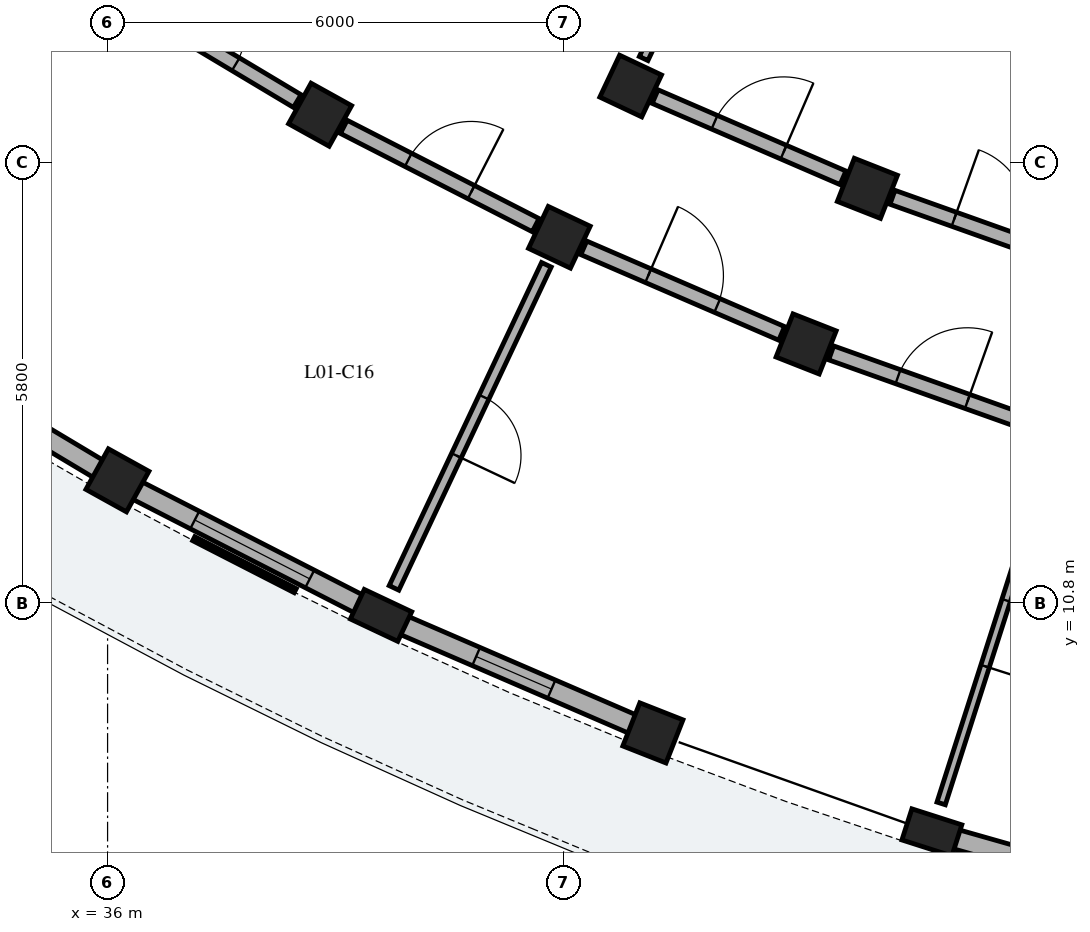
"""IFC4 building model, lengths in metres.
Left out: names, types, materials, properties, quantities, classifications, styles, units other than length and angle.
Written with IfcOpenShell. Run it as: python <this file> out.ifc"""

import sys

from ifc_helpers import new_model, si_unit, direction, frame, frame_2d, origin, origin_2d, place, context, subcontext, project, spatial, rectangle, extrude, element, fill, save


model = new_model("IFC4")
c1 = context("Model", 3, precision=1e-05, world=origin(), true_north=direction((0.0, 1.0)))
c2 = subcontext(c1, "Body", "Model", "MODEL_VIEW")
j1 = project(units=[si_unit("LENGTHUNIT", "METRE"), si_unit("PLANEANGLEUNIT", "RADIAN")], contexts=[c1])
p1 = place(None, origin())
s1 = spatial("IfcSite", under=j1, at=p1, CompositionType="ELEMENT")
p2 = place(p1, origin())
s2 = spatial("IfcBuilding", under=s1, at=p2, CompositionType="ELEMENT")
p3 = place(p2, frame((0.0, 0.0, 4.76)))
s3 = spatial("IfcBuildingStorey", under=s2, at=p3, CompositionType="ELEMENT", Elevation=4.76)
for number, where, z_axis, x_axis in (
    (1, (38.796, 17.227, 0.0), (0.0, 0.0, 1.0), (-0.485, -0.875, 0.0)),
    (2, (36.13, 12.417, 0.0), (0.0, 0.0, 1.0), (-0.485, -0.875, 0.0)),
    (3, (42.882, 17.604, 0.0), (0.0, 0.0, 1.0), (-0.427, -0.904, 0.0)),
    (4, (41.944, 15.614, 0.0), (0.0, 0.0, 1.0), (-0.427, -0.904, 0.0)),
):
    element("IfcColumn", number, at=place(p3, frame(where, z_axis=z_axis, x_axis=x_axis)), inside=s3, PredefinedType="COLUMN", context=c2, shape_type="SweptSolid", body=[
        extrude(rectangle(XDim=0.61, YDim=0.61, at=origin_2d()), origin(), (0.0, 0.0, 1.0), 3.825),
    ])
p4 = place(p3, frame((39.598, 10.64, 0.0), z_axis=(0.0, 0.0, 1.0), x_axis=(-0.426568739901, -0.904455145454, 0.0)))
e5 = element("IfcColumn", 5, at=p4, inside=s3, PredefinedType="PILASTER", context=c2, shape_type="SweptSolid", body=[
    extrude(rectangle(XDim=0.43, YDim=0.69, at=origin_2d()), origin(), (0.0, 0.0, 1.0), 3.825),
])
for number, where, z_axis, x_axis in (
    (6, (45.997, 16.258, 0.0), (0.0, 0.0, 1.0), (-0.367, -0.93, 0.0)),
    (7, (45.191, 14.211, 0.0), (0.0, 0.0, 1.0), (-0.367, -0.93, 0.0)),
    (8, (43.175, 9.094, 0.0), (0.0, 0.0, 1.0), (-0.367, -0.93, 0.0)),
):
    element("IfcColumn", number, at=place(p3, frame(where, z_axis=z_axis, x_axis=x_axis)), inside=s3, PredefinedType="COLUMN", context=c2, shape_type="SweptSolid", body=[
        extrude(rectangle(XDim=0.61, YDim=0.61, at=origin_2d()), origin(), (0.0, 0.0, 1.0), 3.825),
    ])
p5 = place(p3, frame((46.845, 7.785, 0.0), z_axis=(0.0, 0.0, 1.0), x_axis=(-0.304864299028, -0.952395799643, 0.0)))
e9 = element("IfcColumn", 9, at=p5, inside=s3, PredefinedType="PILASTER", context=c2, shape_type="SweptSolid", body=[
    extrude(rectangle(XDim=0.43, YDim=0.69, at=origin_2d()), origin(), (0.0, 0.0, 1.0), 3.825),
])
p6 = place(p3, frame((32.944, 14.321, 0.0), z_axis=(0.0, 0.0, 1.0), x_axis=(0.858281691366, -0.51317885602, 0.0)))
e10 = element("IfcWall", 10, at=p6, inside=s3, PredefinedType="SOLIDWALL", context=c2, shape_type="SweptSolid", body=[
    extrude(rectangle(XDim=3.437, YDim=0.26, at=frame_2d((1.718, 0.0))), origin(), (0.0, 0.0, 1.0), 3.075),
])
p7 = place(p6, frame((0.943, 0.0, 0.55)))
e11 = element("IfcOpeningElement", 11, at=p7, cuts=e10, PredefinedType="OPENING", context=c2, shape_type="SweptSolid", body=[
    extrude(rectangle(XDim=1.55, YDim=1.75, at=frame_2d((0.775, 0.875))), frame((0.0, 0.14, 0.0), z_axis=(0.0, -1.0, 0.0), x_axis=(1.0, 0.0, 0.0)), (0.0, 0.0, 1.0), 0.28),
])
p8 = place(p3, frame((36.374, 12.291, 0.0), z_axis=(0.0, 0.0, 1.0), x_axis=(0.890022976809, -0.455915672852, 0.0)))
e12 = element("IfcWall", 12, at=p8, inside=s3, PredefinedType="SOLIDWALL", context=c2, shape_type="SweptSolid", body=[
    extrude(rectangle(XDim=3.437, YDim=0.26, at=frame_2d((1.718, 0.0))), origin(), (0.0, 0.0, 1.0), 3.075),
])
p9 = place(p8, frame((0.868, 0.0, 0.55)))
e13 = element("IfcOpeningElement", 13, at=p9, cuts=e12, PredefinedType="OPENING", context=c2, shape_type="SweptSolid", body=[
    extrude(rectangle(XDim=1.7, YDim=1.8, at=frame_2d((0.85, 0.9))), frame((0.0, 0.14, 0.0), z_axis=(0.0, -1.0, 0.0), x_axis=(1.0, 0.0, 0.0)), (0.0, 0.0, 1.0), 0.28),
])
p10 = place(p3, frame((39.768, 10.566, 0.0), z_axis=(0.0, 0.0, 1.0), x_axis=(0.917905988043, -0.396797929826, 0.0)))
e14 = element("IfcWall", 14, at=p10, inside=s3, PredefinedType="SOLIDWALL", context=c2, shape_type="SweptSolid", body=[
    extrude(rectangle(XDim=3.437, YDim=0.26, at=frame_2d((1.719, 0.0))), origin(), (0.0, 0.0, 1.0), 3.075),
])
p11 = place(p10, frame((1.178, 0.0, 0.55)))
e15 = element("IfcOpeningElement", 15, at=p11, cuts=e14, PredefinedType="OPENING", context=c2, shape_type="SweptSolid", body=[
    extrude(rectangle(XDim=1.08, YDim=1.45, at=frame_2d((0.54, 0.725))), frame((0.0, 0.14, 0.0), z_axis=(0.0, -1.0, 0.0), x_axis=(1.0, 0.0, 0.0)), (0.0, 0.0, 1.0), 0.28),
])
p12 = place(p3, frame((47.023, 7.734, 0.0), z_axis=(0.0, 0.0, 1.0), x_axis=(0.961876981915, -0.273482488766, 0.0)))
e16 = element("IfcWall", 16, at=p12, inside=s3, PredefinedType="SOLIDWALL", context=c2, shape_type="SweptSolid", body=[
    extrude(rectangle(XDim=3.437, YDim=0.26, at=frame_2d((1.719, 0.0))), origin(), (0.0, 0.0, 1.0), 3.075),
])
p13 = place(p12, frame((1.138, 0.0, 0.55)))
e17 = element("IfcOpeningElement", 17, at=p13, cuts=e16, PredefinedType="OPENING", context=c2, shape_type="SweptSolid", body=[
    extrude(rectangle(XDim=1.16, YDim=1.485, at=frame_2d((0.58, 0.743))), frame((0.0, 0.14, 0.0), z_axis=(0.0, -1.0, 0.0), x_axis=(1.0, 0.0, 0.0)), (0.0, 0.0, 1.0), 0.28),
])
p14 = place(p3, frame((35.544, 18.705, 0.0), z_axis=(0.0, 0.0, 1.0), x_axis=(-0.540959731567, -0.84104849374, 0.0)))
e18 = element("IfcWall", 18, at=p14, inside=s3, PredefinedType="PARTITIONING", context=c2, shape_type="SweptSolid", body=[
    extrude(rectangle(XDim=4.7, YDim=0.115, at=frame_2d((2.35, 0.0))), origin(), (0.0, 0.0, 1.0), 3.09),
])
p15 = place(p14, frame((1.915, 0.0, 0.0)))
e19 = element("IfcOpeningElement", 19, at=p15, cuts=e18, PredefinedType="OPENING", context=c2, shape_type="SweptSolid", body=[
    extrude(rectangle(XDim=0.87, YDim=2.08, at=frame_2d((0.435, 1.04))), frame((0.0, 0.067, 0.0), z_axis=(0.0, -1.0, 0.0), x_axis=(1.0, 0.0, 0.0)), (0.0, 0.0, 1.0), 0.135),
])
p16 = place(p3, frame((36.061, 18.862, 0.0), z_axis=(0.0, 0.0, 1.0), x_axis=(0.858281647443, -0.51317892948, 0.0)))
e20 = element("IfcWall", 20, at=p16, inside=s3, PredefinedType="PARTITIONING", context=c2, shape_type="SweptSolid", body=[
    extrude(rectangle(XDim=2.837, YDim=0.195, at=frame_2d((1.418, 0.0))), origin(), (0.0, 0.0, 1.0), 3.09),
])
p17 = place(p16, frame((0.944, 0.0, 0.0)))
e21 = element("IfcOpeningElement", 21, at=p17, cuts=e20, PredefinedType="OPENING", context=c2, shape_type="SweptSolid", body=[
    extrude(rectangle(XDim=0.95, YDim=2.13, at=frame_2d((0.475, 1.065))), frame((0.0, 0.107, 0.0), z_axis=(0.0, -1.0, 0.0), x_axis=(1.0, 0.0, 0.0)), (0.0, 0.0, 1.0), 0.215),
])
p18 = place(p3, frame((39.107, 17.067, 0.0), z_axis=(0.0, 0.0, 1.0), x_axis=(0.890030590607, -0.45590080915, 0.0)))
e22 = element("IfcWall", 22, at=p18, inside=s3, PredefinedType="PARTITIONING", context=c2, shape_type="SweptSolid", body=[
    extrude(rectangle(XDim=2.837, YDim=0.195, at=frame_2d((1.418, 0.0))), origin(), (0.0, 0.0, 1.0), 3.09),
])
p19 = place(p18, frame((0.954, 0.0, 0.0)))
e23 = element("IfcOpeningElement", 23, at=p19, cuts=e22, PredefinedType="OPENING", context=c2, shape_type="SweptSolid", body=[
    extrude(rectangle(XDim=0.93, YDim=2.12, at=frame_2d((0.465, 1.06))), frame((0.0, 0.107, 0.0), z_axis=(0.0, -1.0, 0.0), x_axis=(1.0, 0.0, 0.0)), (0.0, 0.0, 1.0), 0.215),
])
p20 = place(p3, frame((41.773, 15.252, 0.0), z_axis=(0.0, 0.0, 1.0), x_axis=(-0.426567365945, -0.904455793453, 0.0)))
e24 = element("IfcWall", 24, at=p20, inside=s3, PredefinedType="PLUMBINGWALL", context=c2, shape_type="SweptSolid", body=[
    extrude(rectangle(XDim=4.7, YDim=0.14, at=frame_2d((2.35, 0.0))), origin(), (0.0, 0.0, 1.0), 3.09),
])
p21 = place(p20, frame((1.925, 0.0, 0.0)))
e25 = element("IfcOpeningElement", 25, at=p21, cuts=e24, PredefinedType="OPENING", context=c2, shape_type="SweptSolid", body=[
    extrude(rectangle(XDim=0.85, YDim=2.05, at=frame_2d((0.425, 1.025))), frame((0.0, 0.08, 0.0), z_axis=(0.0, -1.0, 0.0), x_axis=(1.0, 0.0, 0.0)), (0.0, 0.0, 1.0), 0.16),
])
p22 = place(p3, frame((45.868, 23.935, 0.0), z_axis=(0.0, 0.0, 1.0), x_axis=(-0.426573573579, -0.904452865728, 0.0)))
e26 = element("IfcWall", 26, at=p22, inside=s3, PredefinedType="PARTITIONING", context=c2, shape_type="SweptSolid", body=[
    extrude(rectangle(XDim=6.6, YDim=0.125, at=frame_2d((3.3, 0.0))), origin(), (0.0, 0.0, 1.0), 3.09),
])
p23 = place(p22, frame((2.865, 0.0, 0.0)))
e27 = element("IfcOpeningElement", 27, at=p23, cuts=e26, PredefinedType="OPENING", context=c2, shape_type="SweptSolid", body=[
    extrude(rectangle(XDim=0.87, YDim=2.08, at=frame_2d((0.435, 1.04))), frame((0.0, 0.073, 0.0), z_axis=(0.0, -1.0, 0.0), x_axis=(1.0, 0.0, 0.0)), (0.0, 0.0, 1.0), 0.145),
])
p24 = place(p3, frame((42.265, 15.475, 0.0), z_axis=(0.0, 0.0, 1.0), x_axis=(0.917943439406, -0.396711282991, 0.0)))
e28 = element("IfcWall", 28, at=p24, inside=s3, PredefinedType="PARTITIONING", context=c2, shape_type="SweptSolid", body=[
    extrude(rectangle(XDim=2.837, YDim=0.195, at=frame_2d((1.418, 0.0))), origin(), (0.0, 0.0, 1.0), 3.09),
])
p25 = place(p24, frame((0.924, 0.0, 0.0)))
e29 = element("IfcOpeningElement", 29, at=p25, cuts=e28, PredefinedType="OPENING", context=c2, shape_type="SweptSolid", body=[
    extrude(rectangle(XDim=0.99, YDim=2.16, at=frame_2d((0.495, 1.08))), frame((0.0, 0.107, 0.0), z_axis=(0.0, -1.0, 0.0), x_axis=(1.0, 0.0, 0.0)), (0.0, 0.0, 1.0), 0.215),
])
p26 = place(p3, frame((43.204, 17.465, 0.0), z_axis=(0.0, 0.0, 1.0), x_axis=(0.91793557165, -0.39672948756, 0.0)))
e30 = element("IfcWall", 30, at=p26, inside=s3, PredefinedType="PARTITIONING", context=c2, shape_type="SweptSolid", body=[
    extrude(rectangle(XDim=2.693, YDim=0.195, at=frame_2d((1.346, 0.0))), origin(), (0.0, 0.0, 1.0), 3.09),
])
p27 = place(p26, frame((0.852, 0.0, 0.0)))
e31 = element("IfcOpeningElement", 31, at=p27, cuts=e30, PredefinedType="OPENING", context=c2, shape_type="SweptSolid", body=[
    extrude(rectangle(XDim=0.99, YDim=2.16, at=frame_2d((0.495, 1.08))), frame((0.0, 0.107, 0.0), z_axis=(0.0, -1.0, 0.0), x_axis=(1.0, 0.0, 0.0)), (0.0, 0.0, 1.0), 0.215),
])
p28 = place(p3, frame((45.52, 14.093, 0.0), z_axis=(0.0, 0.0, 1.0), x_axis=(0.941930628611, -0.335807520589, 0.0)))
e32 = element("IfcWall", 32, at=p28, inside=s3, PredefinedType="PARTITIONING", context=c2, shape_type="SweptSolid", body=[
    extrude(rectangle(XDim=2.837, YDim=0.195, at=frame_2d((1.418, 0.0))), origin(), (0.0, 0.0, 1.0), 3.09),
])
p29 = place(p28, frame((0.934, 0.0, 0.0)))
e33 = element("IfcOpeningElement", 33, at=p29, cuts=e32, PredefinedType="OPENING", context=c2, shape_type="SweptSolid", body=[
    extrude(rectangle(XDim=0.97, YDim=2.15, at=frame_2d((0.485, 1.075))), frame((0.0, 0.107, 0.0), z_axis=(0.0, -1.0, 0.0), x_axis=(1.0, 0.0, 0.0)), (0.0, 0.0, 1.0), 0.215),
])
p30 = place(p3, frame((46.327, 16.14, 0.0), z_axis=(0.0, 0.0, 1.0), x_axis=(0.941895652647, -0.335905611036, 0.0)))
e34 = element("IfcWall", 34, at=p30, inside=s3, PredefinedType="PARTITIONING", context=c2, shape_type="SweptSolid", body=[
    extrude(rectangle(XDim=2.693, YDim=0.195, at=frame_2d((1.346, 0.0))), origin(), (0.0, 0.0, 1.0), 3.09),
])
p31 = place(p30, frame((0.862, 0.0, 0.0)))
e35 = element("IfcOpeningElement", 35, at=p31, cuts=e34, PredefinedType="OPENING", context=c2, shape_type="SweptSolid", body=[
    extrude(rectangle(XDim=0.97, YDim=2.15, at=frame_2d((0.485, 1.075))), frame((0.0, 0.107, 0.0), z_axis=(0.0, -1.0, 0.0), x_axis=(1.0, 0.0, 0.0)), (0.0, 0.0, 1.0), 0.215),
])
p32 = place(p3, frame((48.4, 12.642, 0.0), z_axis=(0.0, 0.0, 1.0), x_axis=(-0.304860540454, -0.952397002764, 0.0)))
e36 = element("IfcWall", 36, at=p32, inside=s3, PredefinedType="PARTITIONING", context=c2, shape_type="SweptSolid", body=[
    extrude(rectangle(XDim=4.7, YDim=0.115, at=frame_2d((2.35, 0.0))), origin(), (0.0, 0.0, 1.0), 3.09),
])
p33 = place(p32, frame((1.895, 0.0, 0.0)))
e37 = element("IfcOpeningElement", 37, at=p33, cuts=e36, PredefinedType="OPENING", context=c2, shape_type="SweptSolid", body=[
    extrude(rectangle(XDim=0.91, YDim=2.1, at=frame_2d((0.455, 1.05))), frame((0.0, 0.067, 0.0), z_axis=(0.0, -1.0, 0.0), x_axis=(1.0, 0.0, 0.0)), (0.0, 0.0, 1.0), 0.135),
])
p34 = place(p9, origin())
e38 = element("IfcWindow", 38, at=p34, inside=s3, PartitioningType="SINGLE_PANEL", PredefinedType="WINDOW", context=c2, shape_type="SweptSolid", body=[
    extrude(rectangle(XDim=1.7, YDim=1.8, at=frame_2d((0.85, 0.9))), frame((0.0, 0.03, 0.0), z_axis=(0.0, -1.0, 0.0), x_axis=(1.0, 0.0, 0.0)), (0.0, 0.0, 1.0), 0.06),
])
fill(e13, e38)
p35 = place(p11, origin())
e39 = element("IfcWindow", 39, at=p35, inside=s3, PartitioningType="SINGLE_PANEL", PredefinedType="WINDOW", context=c2, shape_type="SweptSolid", body=[
    extrude(rectangle(XDim=1.08, YDim=1.45, at=frame_2d((0.54, 0.725))), frame((0.0, 0.03, 0.0), z_axis=(0.0, -1.0, 0.0), x_axis=(1.0, 0.0, 0.0)), (0.0, 0.0, 1.0), 0.06),
])
fill(e15, e39)
p36 = place(p17, origin())
e40 = element("IfcDoor", 40, at=p36, inside=s3, OperationType="SINGLE_SWING_LEFT", PredefinedType="DOOR", context=c2, shape_type="SweptSolid", body=[
    extrude(rectangle(XDim=0.95, YDim=2.13, at=frame_2d((0.475, 1.065))), frame((0.0, 0.025, 0.0), z_axis=(0.0, -1.0, 0.0), x_axis=(1.0, 0.0, 0.0)), (0.0, 0.0, 1.0), 0.05),
])
fill(e21, e40)
p37 = place(p19, origin())
e41 = element("IfcDoor", 41, at=p37, inside=s3, OperationType="SINGLE_SWING_RIGHT", PredefinedType="DOOR", context=c2, shape_type="SweptSolid", body=[
    extrude(rectangle(XDim=0.93, YDim=2.12, at=frame_2d((0.465, 1.06))), frame((0.0, 0.025, 0.0), z_axis=(0.0, -1.0, 0.0), x_axis=(1.0, 0.0, 0.0)), (0.0, 0.0, 1.0), 0.05),
])
fill(e23, e41)
p38 = place(p21, origin())
e42 = element("IfcDoor", 42, at=p38, inside=s3, OperationType="SINGLE_SWING_RIGHT", PredefinedType="DOOR", context=c2, shape_type="SweptSolid", body=[
    extrude(rectangle(XDim=0.85, YDim=2.05, at=frame_2d((0.425, 1.025))), frame((0.0, 0.025, 0.0), z_axis=(0.0, -1.0, 0.0), x_axis=(1.0, 0.0, 0.0)), (0.0, 0.0, 1.0), 0.05),
])
fill(e25, e42)
p39 = place(p25, origin())
e43 = element("IfcDoor", 43, at=p39, inside=s3, OperationType="SINGLE_SWING_LEFT", PredefinedType="DOOR", context=c2, shape_type="SweptSolid", body=[
    extrude(rectangle(XDim=0.99, YDim=2.16, at=frame_2d((0.495, 1.08))), frame((0.0, 0.025, 0.0), z_axis=(0.0, -1.0, 0.0), x_axis=(1.0, 0.0, 0.0)), (0.0, 0.0, 1.0), 0.05),
])
fill(e29, e43)
p40 = place(p27, origin())
e44 = element("IfcDoor", 44, at=p40, inside=s3, OperationType="SINGLE_SWING_RIGHT", PredefinedType="DOOR", context=c2, shape_type="SweptSolid", body=[
    extrude(rectangle(XDim=0.99, YDim=2.16, at=frame_2d((0.495, 1.08))), frame((0.0, 0.025, 0.0), z_axis=(0.0, -1.0, 0.0), x_axis=(1.0, 0.0, 0.0)), (0.0, 0.0, 1.0), 0.05),
])
fill(e31, e44)
p41 = place(p29, origin())
e45 = element("IfcDoor", 45, at=p41, inside=s3, OperationType="SINGLE_SWING_RIGHT", PredefinedType="DOOR", context=c2, shape_type="SweptSolid", body=[
    extrude(rectangle(XDim=0.97, YDim=2.15, at=frame_2d((0.485, 1.075))), frame((0.0, 0.025, 0.0), z_axis=(0.0, -1.0, 0.0), x_axis=(1.0, 0.0, 0.0)), (0.0, 0.0, 1.0), 0.05),
])
fill(e33, e45)
p42 = place(p31, origin())
e46 = element("IfcDoor", 46, at=p42, inside=s3, OperationType="SINGLE_SWING_LEFT", PredefinedType="DOOR", context=c2, shape_type="SweptSolid", body=[
    extrude(rectangle(XDim=0.97, YDim=2.15, at=frame_2d((0.485, 1.075))), frame((0.0, 0.025, 0.0), z_axis=(0.0, -1.0, 0.0), x_axis=(1.0, 0.0, 0.0)), (0.0, 0.0, 1.0), 0.05),
])
fill(e35, e46)
p43 = place(p33, origin())
e47 = element("IfcDoor", 47, at=p43, inside=s3, OperationType="SINGLE_SWING_RIGHT", PredefinedType="DOOR", context=c2, shape_type="SweptSolid", body=[
    extrude(rectangle(XDim=0.91, YDim=2.1, at=frame_2d((0.455, 1.05))), frame((0.0, 0.025, 0.0), z_axis=(0.0, -1.0, 0.0), x_axis=(1.0, 0.0, 0.0)), (0.0, 0.0, 1.0), 0.05),
])
fill(e37, e47)
save(model, sys.argv[1])
